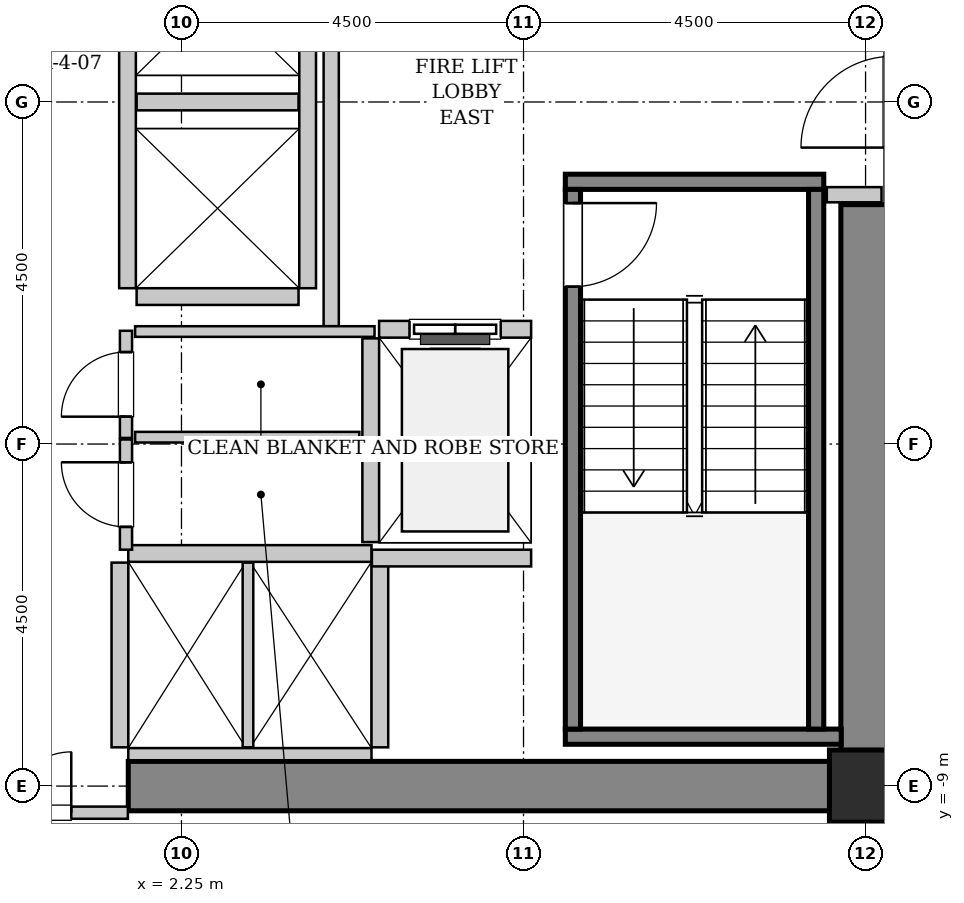
"""IFC4 building model, lengths in metres.
Left out: names, types, materials, properties, quantities, classifications, styles, units other than length and angle.
Written with IfcOpenShell. Run it as: python <this file> out.ifc"""

import sys

from ifc_helpers import new_model, si_unit, direction, frame, frame_2d, origin, origin_2d, place, context, subcontext, project, spatial, rectangle, hollow_rectangle, extrude, source, transform, mapped, element, fill, save


model = new_model("IFC4")
c1 = context("Model", 3, precision=1e-05, world=origin(), true_north=direction((0.0, 1.0)))
c2 = subcontext(c1, "Body", "Model", "MODEL_VIEW")
j1 = project(units=[si_unit("LENGTHUNIT", "METRE"), si_unit("PLANEANGLEUNIT", "RADIAN")], contexts=[c1])
p1 = place(None, origin())
s1 = spatial("IfcSite", under=j1, at=p1, CompositionType="ELEMENT")
p2 = place(p1, origin())
s2 = spatial("IfcBuilding", under=s1, at=p2, CompositionType="ELEMENT")
p3 = place(p2, frame((0.0, 0.0, 71.0)))
s3 = spatial("IfcBuildingStorey", under=s2, at=p3, CompositionType="ELEMENT", Elevation=71.0)
m1 = source(origin(), c2, "Body", "SweptSolid", [
    extrude(rectangle(XDim=10.025, YDim=0.65, at=frame_2d((5.012, 0.0))), origin(), (0.0, 0.0, 1.0), 3.8),
])
p4 = place(p3, frame((1.55, -9.0, 0.0), z_axis=(0.0, 0.0, 1.0), x_axis=(1.0, 0.0, 0.0)))
e1 = element("IfcWall", 1, at=p4, inside=s3, PredefinedType="SHEAR", context=c2, shape_type="MappedRepresentation", body=[
    mapped(m1, transform((0.0, 0.0, 0.0), x_axis=(1.0, 0.0, 0.0), y_axis=(0.0, 1.0, 0.0), z_axis=(0.0, 0.0, 1.0), scale=1.0)),
])
m2 = source(origin(), c2, "Body", "SweptSolid", [
    extrude(rectangle(XDim=7.325, YDim=0.65, at=frame_2d((3.663, 0.0))), origin(), (0.0, 0.0, 1.0), 3.8),
])
p5 = place(p3, frame((11.25, -8.675, 0.0), z_axis=(0.0, 0.0, 1.0), x_axis=(0.0, 1.0, 0.0)))
e2 = element("IfcWall", 2, at=p5, inside=s3, PredefinedType="SHEAR", context=c2, shape_type="MappedRepresentation", body=[
    mapped(m2, transform((0.0, 0.0, 0.0), x_axis=(1.0, 0.0, 0.0), y_axis=(0.0, 1.0, 0.0), z_axis=(0.0, 0.0, 1.0), scale=1.0)),
])
m3 = source(origin(), c2, "Body", "SweptSolid", [
    extrude(hollow_rectangle(XDim=0.95, YDim=0.95, WallThickness=0.045, InnerFilletRadius=0.045, OuterFilletRadius=0.09, at=origin_2d()), origin(), (0.0, 0.0, 1.0), 3.8),
])
p6 = place(p3, frame((11.25, -9.0, 0.0), z_axis=(0.0, 0.0, 1.0), x_axis=(1.0, 0.0, 0.0)))
e3 = element("IfcColumn", 3, at=p6, inside=s3, PredefinedType="COLUMN", context=c2, shape_type="MappedRepresentation", body=[
    mapped(m3, transform((0.0, 0.0, 0.0), x_axis=(1.0, 0.0, 0.0), y_axis=(0.0, 1.0, 0.0), z_axis=(0.0, 0.0, 1.0), scale=1.0)),
])
m4 = source(origin(), c2, "Body", "SweptSolid", [
    extrude(rectangle(XDim=3.4, YDim=0.2, at=frame_2d((1.7, 0.0))), origin(), (0.0, 0.0, 1.0), 3.8),
])
p7 = place(p3, frame((7.3, -1.05, 0.0), z_axis=(0.0, 0.0, 1.0), x_axis=(1.0, 0.0, 0.0)))
e4 = element("IfcWall", 4, at=p7, inside=s3, PredefinedType="SOLIDWALL", context=c2, shape_type="MappedRepresentation", body=[
    mapped(m4, transform((0.0, 0.0, 0.0), x_axis=(1.0, 0.0, 0.0), y_axis=(0.0, 1.0, 0.0), z_axis=(0.0, 0.0, 1.0), scale=1.0)),
])
m5 = source(origin(), c2, "Body", "SweptSolid", [
    extrude(rectangle(XDim=3.63, YDim=0.2, at=frame_2d((1.815, 0.0))), origin(), (0.0, 0.0, 1.0), 3.8),
])
p8 = place(p3, frame((7.3, -8.35, 0.0), z_axis=(0.0, 0.0, 1.0), x_axis=(1.0, 0.0, 0.0)))
e5 = element("IfcWall", 5, at=p8, inside=s3, PredefinedType="SOLIDWALL", context=c2, shape_type="MappedRepresentation", body=[
    mapped(m5, transform((0.0, 0.0, 0.0), x_axis=(1.0, 0.0, 0.0), y_axis=(0.0, 1.0, 0.0), z_axis=(0.0, 0.0, 1.0), scale=1.0)),
])
m6 = source(origin(), c2, "Body", "SweptSolid", [
    extrude(rectangle(XDim=7.1, YDim=0.2, at=frame_2d((3.55, 0.0))), origin(), (0.0, 0.0, 1.0), 3.8),
])
p9 = place(p3, frame((7.4, -1.15, 0.0), z_axis=(0.0, 0.0, 1.0), x_axis=(0.0, -1.0, 0.0)))
e6 = element("IfcWall", 6, at=p9, inside=s3, PredefinedType="SOLIDWALL", context=c2, shape_type="MappedRepresentation", body=[
    mapped(m6, transform((0.0, 0.0, 0.0), x_axis=(1.0, 0.0, 0.0), y_axis=(0.0, 1.0, 0.0), z_axis=(0.0, 0.0, 1.0), scale=1.0)),
])
p10 = place(p9, frame((0.18, 0.0, 0.0)))
e7 = element("IfcOpeningElement", 7, at=p10, cuts=e6, PredefinedType="OPENING", context=c2, shape_type="SweptSolid", body=[
    extrude(rectangle(XDim=1.1, YDim=2.15, at=frame_2d((0.55, 1.075))), frame((0.0, 0.11, 0.0), z_axis=(0.0, -1.0, 0.0), x_axis=(1.0, 0.0, 0.0)), (0.0, 0.0, 1.0), 0.22),
])
p11 = place(p3, frame((10.6, -1.15, 0.0), z_axis=(0.0, 0.0, 1.0), x_axis=(0.0, -1.0, 0.0)))
e8 = element("IfcWall", 8, at=p11, inside=s3, PredefinedType="SOLIDWALL", context=c2, shape_type="MappedRepresentation", body=[
    mapped(m6, transform((0.0, 0.0, 0.0), x_axis=(1.0, 0.0, 0.0), y_axis=(0.0, 1.0, 0.0), z_axis=(0.0, 0.0, 1.0), scale=1.0)),
])
m7 = source(origin(), c2, "Body", "SweptSolid", [
    extrude(rectangle(XDim=2.0, YDim=0.22, at=frame_2d((1.0, 0.0))), origin(), (0.0, 0.0, 1.0), 3.535),
])
p12 = place(p3, frame((6.85, -2.99, 0.0), z_axis=(0.0, 0.0, 1.0), x_axis=(-1.0, 0.0, 0.0)))
e9 = element("IfcWall", 9, at=p12, inside=s3, PredefinedType="SOLIDWALL", context=c2, shape_type="MappedRepresentation", body=[
    mapped(m7, transform((0.0, 0.0, 0.0), x_axis=(1.0, 0.0, 0.0), y_axis=(0.0, 1.0, 0.0), z_axis=(0.0, 0.0, 1.0), scale=1.0)),
])
p13 = place(p12, frame((0.4, 0.0, 0.0)))
e10 = element("IfcOpeningElement", 10, at=p13, cuts=e9, PredefinedType="OPENING", context=c2, shape_type="SweptSolid", body=[
    extrude(rectangle(XDim=1.2, YDim=2.2, at=frame_2d((0.6, 1.1))), frame((0.0, 0.12, 0.0), z_axis=(0.0, -1.0, 0.0), x_axis=(1.0, 0.0, 0.0)), (0.0, 0.0, 1.0), 0.24),
])
m8 = source(origin(), c2, "Body", "SweptSolid", [
    extrude(rectangle(XDim=2.68, YDim=0.22, at=frame_2d((1.34, 0.0))), origin(), (0.0, 0.0, 1.0), 3.535),
])
p14 = place(p3, frame((4.74, -3.11, 0.0), z_axis=(0.0, 0.0, 1.0), x_axis=(0.0, -1.0, 0.0)))
e11 = element("IfcWall", 11, at=p14, inside=s3, PredefinedType="SOLIDWALL", context=c2, shape_type="MappedRepresentation", body=[
    mapped(m8, transform((0.0, 0.0, 0.0), x_axis=(1.0, 0.0, 0.0), y_axis=(0.0, 1.0, 0.0), z_axis=(0.0, 0.0, 1.0), scale=1.0)),
])
m9 = source(origin(), c2, "Body", "SweptSolid", [
    extrude(rectangle(XDim=3.2, YDim=0.22, at=frame_2d((1.6, 0.0))), origin(), (0.0, 0.0, 1.0), 3.535),
])
p15 = place(p3, frame((4.75, -5.94, 0.0), z_axis=(0.0, 0.0, 1.0), x_axis=(-1.0, 0.0, 0.0)))
e12 = element("IfcWall", 12, at=p15, inside=s3, PredefinedType="SOLIDWALL", context=c2, shape_type="MappedRepresentation", body=[
    mapped(m9, transform((0.0, 0.0, 0.0), x_axis=(1.0, 0.0, 0.0), y_axis=(0.0, 1.0, 0.0), z_axis=(0.0, 0.0, 1.0), scale=1.0)),
])
m10 = source(origin(), c2, "Body", "SweptSolid", [
    extrude(rectangle(XDim=3.2, YDim=0.16, at=frame_2d((1.6, 0.0))), origin(), (0.0, 0.0, 1.0), 2.425),
])
p16 = place(p3, frame((1.55, -8.58, 0.0), z_axis=(0.0, 0.0, 1.0), x_axis=(1.0, 0.0, 0.0)))
e13 = element("IfcWall", 13, at=p16, inside=s3, PredefinedType="PARTITIONING", context=c2, shape_type="MappedRepresentation", body=[
    mapped(m10, transform((0.0, 0.0, 0.0), x_axis=(1.0, 0.0, 0.0), y_axis=(0.0, 1.0, 0.0), z_axis=(0.0, 0.0, 1.0), scale=1.0)),
])
m11 = source(origin(), c2, "Body", "SweptSolid", [
    extrude(rectangle(XDim=2.43, YDim=0.22, at=frame_2d((1.215, 0.0))), origin(), (0.0, 0.0, 1.0), 3.535),
])
p17 = place(p3, frame((1.44, -6.06, 0.0), z_axis=(0.0, 0.0, 1.0), x_axis=(0.0, -1.0, 0.0)))
e14 = element("IfcWall", 14, at=p17, inside=s3, PredefinedType="SOLIDWALL", context=c2, shape_type="MappedRepresentation", body=[
    mapped(m11, transform((0.0, 0.0, 0.0), x_axis=(1.0, 0.0, 0.0), y_axis=(0.0, 1.0, 0.0), z_axis=(0.0, 0.0, 1.0), scale=1.0)),
])
m12 = source(origin(), c2, "Body", "SweptSolid", [
    extrude(rectangle(XDim=2.43, YDim=0.14, at=frame_2d((1.215, 0.0))), origin(), (0.0, 0.0, 1.0), 3.535),
])
p18 = place(p3, frame((3.125, -8.49, 0.0), z_axis=(0.0, 0.0, 1.0), x_axis=(0.0, 1.0, 0.0)))
e15 = element("IfcWall", 15, at=p18, inside=s3, PredefinedType="PARTITIONING", context=c2, shape_type="MappedRepresentation", body=[
    mapped(m12, transform((0.0, 0.0, 0.0), x_axis=(1.0, 0.0, 0.0), y_axis=(0.0, 1.0, 0.0), z_axis=(0.0, 0.0, 1.0), scale=1.0)),
])
p19 = place(p3, frame((4.86, -8.49, 0.0), z_axis=(0.0, 0.0, 1.0), x_axis=(0.0, 1.0, 0.0)))
e16 = element("IfcWall", 16, at=p19, inside=s3, PredefinedType="SOLIDWALL", context=c2, shape_type="MappedRepresentation", body=[
    mapped(m11, transform((0.0, 0.0, 0.0), x_axis=(1.0, 0.0, 0.0), y_axis=(0.0, 1.0, 0.0), z_axis=(0.0, 0.0, 1.0), scale=1.0)),
])
m13 = source(origin(), c2, "Body", "SweptSolid", [
    extrude(rectangle(XDim=4.9, YDim=0.22, at=frame_2d((2.45, 0.0))), origin(), (0.0, 0.0, 1.0), 3.535),
])
for number, where, z_axis, x_axis in (
    (17, (1.54, 2.45, 0.0), (0.0, 0.0, 1.0), (0.0, -1.0, 0.0)),
    (18, (3.91, -2.45, 0.0), (0.0, 0.0, 1.0), (0.0, 1.0, 0.0)),
):
    element("IfcWall", number, at=place(p3, frame(where, z_axis=z_axis, x_axis=x_axis)), inside=s3, PredefinedType="SOLIDWALL", context=c2, shape_type="MappedRepresentation", body=[
        mapped(m13, transform((0.0, 0.0, 0.0), x_axis=(1.0, 0.0, 0.0), y_axis=(0.0, 1.0, 0.0), z_axis=(0.0, 0.0, 1.0), scale=1.0)),
    ])
m14 = source(origin(), c2, "Body", "SweptSolid", [
    extrude(rectangle(XDim=2.13, YDim=0.22, at=frame_2d((1.065, 0.0))), origin(), (0.0, 0.0, 1.0), 3.535),
])
for number, where, z_axis, x_axis in (
    (19, (1.66, -2.56, 0.0), (0.0, 0.0, 1.0), (1.0, 0.0, 0.0)),
    (20, (1.66, 0.0, 0.0), (0.0, 0.0, 1.0), (1.0, 0.0, 0.0)),
):
    element("IfcWall", number, at=place(p3, frame(where, z_axis=z_axis, x_axis=x_axis)), inside=s3, PredefinedType="SOLIDWALL", context=c2, shape_type="MappedRepresentation", body=[
        mapped(m14, transform((0.0, 0.0, 0.0), x_axis=(1.0, 0.0, 0.0), y_axis=(0.0, 1.0, 0.0), z_axis=(0.0, 0.0, 1.0), scale=1.0)),
    ])
m15 = source(origin(), c2, "Body", "SweptSolid", [
    extrude(rectangle(XDim=2.095, YDim=0.22, at=frame_2d((1.048, 0.0))), origin(), (0.0, 0.0, 1.0), 3.535),
])
p20 = place(p3, frame((4.755, -6.0, 0.0), z_axis=(0.0, 0.0, 1.0), x_axis=(1.0, 0.0, 0.0)))
e21 = element("IfcWall", 21, at=p20, inside=s3, PredefinedType="SOLIDWALL", context=c2, shape_type="MappedRepresentation", body=[
    mapped(m15, transform((0.0, 0.0, 0.0), x_axis=(1.0, 0.0, 0.0), y_axis=(0.0, 1.0, 0.0), z_axis=(0.0, 0.0, 1.0), scale=1.0)),
])
m16 = source(origin(), c2, "Body", "SweptSolid", [
    extrude(rectangle(XDim=5.9, YDim=0.2, at=frame_2d((2.95, 0.0))), origin(), (0.0, 0.0, 1.0), 3.535),
])
p21 = place(p3, frame((4.22, -2.95, 0.0), z_axis=(0.0, 0.0, 1.0), x_axis=(0.0, 1.0, 0.0)))
e22 = element("IfcWall", 22, at=p21, inside=s3, PredefinedType="PARTITIONING", context=c2, shape_type="MappedRepresentation", body=[
    mapped(m16, transform((0.0, 0.0, 0.0), x_axis=(1.0, 0.0, 0.0), y_axis=(0.0, 1.0, 0.0), z_axis=(0.0, 0.0, 1.0), scale=1.0)),
])
m17 = source(origin(), c2, "Body", "SweptSolid", [
    extrude(rectangle(XDim=0.72, YDim=0.2, at=frame_2d((0.36, 0.0))), origin(), (0.0, 0.0, 1.0), 3.535),
])
p22 = place(p3, frame((10.74, -1.22, 0.0), z_axis=(0.0, 0.0, 1.0), x_axis=(1.0, 0.0, 0.0)))
e23 = element("IfcWall", 23, at=p22, inside=s3, PredefinedType="PARTITIONING", context=c2, shape_type="MappedRepresentation", body=[
    mapped(m17, transform((0.0, 0.0, 0.0), x_axis=(1.0, 0.0, 0.0), y_axis=(0.0, 1.0, 0.0), z_axis=(0.0, 0.0, 1.0), scale=1.0)),
])
m18 = source(origin(), c2, "Body", "SweptSolid", [
    extrude(rectangle(XDim=3.09, YDim=0.16, at=frame_2d((1.545, 0.0))), origin(), (0.0, 0.0, 1.0), 2.425),
])
p23 = place(p3, frame((-1.545, -9.35, 0.0), z_axis=(0.0, 0.0, 1.0), x_axis=(1.0, 0.0, 0.0)))
e24 = element("IfcWall", 24, at=p23, inside=s3, PredefinedType="PARTITIONING", context=c2, shape_type="MappedRepresentation", body=[
    mapped(m18, transform((0.0, 0.0, 0.0), x_axis=(1.0, 0.0, 0.0), y_axis=(0.0, 1.0, 0.0), z_axis=(0.0, 0.0, 1.0), scale=1.0)),
])
p24 = place(p23, frame((0.745, 0.0, 0.0)))
e25 = element("IfcOpeningElement", 25, at=p24, cuts=e24, PredefinedType="OPENING", context=c2, shape_type="SweptSolid", body=[
    extrude(rectangle(XDim=1.6, YDim=2.3, at=frame_2d((0.8, 1.15))), frame((0.0, 0.09, 0.0), z_axis=(0.0, -1.0, 0.0), x_axis=(1.0, 0.0, 0.0)), (0.0, 0.0, 1.0), 0.18),
])
m19 = source(origin(), c2, "Body", "SweptSolid", [
    extrude(rectangle(XDim=1.41, YDim=0.16, at=frame_2d((0.705, 0.0))), origin(), (0.0, 0.0, 1.0), 3.535),
])
p25 = place(p3, frame((1.52, -4.42, 0.0), z_axis=(0.0, 0.0, 1.0), x_axis=(0.0, 1.0, 0.0)))
e26 = element("IfcWall", 26, at=p25, inside=s3, PredefinedType="PARTITIONING", context=c2, shape_type="MappedRepresentation", body=[
    mapped(m19, transform((0.0, 0.0, 0.0), x_axis=(1.0, 0.0, 0.0), y_axis=(0.0, 1.0, 0.0), z_axis=(0.0, 0.0, 1.0), scale=1.0)),
])
p26 = place(p25, frame((0.28, 0.0, 0.0)))
e27 = element("IfcOpeningElement", 27, at=p26, cuts=e26, PredefinedType="OPENING", context=c2, shape_type="SweptSolid", body=[
    extrude(rectangle(XDim=0.85, YDim=2.1, at=frame_2d((0.425, 1.05))), frame((0.0, 0.09, 0.0), z_axis=(0.0, -1.0, 0.0), x_axis=(1.0, 0.0, 0.0)), (0.0, 0.0, 1.0), 0.18),
])
m20 = source(origin(), c2, "Body", "SweptSolid", [
    extrude(rectangle(XDim=3.15, YDim=0.14, at=frame_2d((1.575, 0.0))), origin(), (0.0, 0.0, 1.0), 3.535),
])
p27 = place(p3, frame((1.64, -3.02, 0.0), z_axis=(0.0, 0.0, 1.0), x_axis=(1.0, 0.0, 0.0)))
e28 = element("IfcWall", 28, at=p27, inside=s3, PredefinedType="PARTITIONING", context=c2, shape_type="MappedRepresentation", body=[
    mapped(m20, transform((0.0, 0.0, 0.0), x_axis=(1.0, 0.0, 0.0), y_axis=(0.0, 1.0, 0.0), z_axis=(0.0, 0.0, 1.0), scale=1.0)),
])
m21 = source(origin(), c2, "Body", "SweptSolid", [
    extrude(rectangle(XDim=2.95, YDim=0.14, at=frame_2d((1.475, 0.0))), origin(), (0.0, 0.0, 1.0), 3.535),
])
p28 = place(p3, frame((1.64, -4.41, 0.0), z_axis=(0.0, 0.0, 1.0), x_axis=(1.0, 0.0, 0.0)))
e29 = element("IfcWall", 29, at=p28, inside=s3, PredefinedType="PARTITIONING", context=c2, shape_type="MappedRepresentation", body=[
    mapped(m21, transform((0.0, 0.0, 0.0), x_axis=(1.0, 0.0, 0.0), y_axis=(0.0, 1.0, 0.0), z_axis=(0.0, 0.0, 1.0), scale=1.0)),
])
m22 = source(origin(), c2, "Body", "SweptSolid", [
    extrude(rectangle(XDim=1.45, YDim=0.16, at=frame_2d((0.725, 0.0))), origin(), (0.0, 0.0, 1.0), 3.535),
])
p29 = place(p3, frame((1.52, -5.89, 0.0), z_axis=(0.0, 0.0, 1.0), x_axis=(0.0, 1.0, 0.0)))
e30 = element("IfcWall", 30, at=p29, inside=s3, PredefinedType="PARTITIONING", context=c2, shape_type="MappedRepresentation", body=[
    mapped(m22, transform((0.0, 0.0, 0.0), x_axis=(1.0, 0.0, 0.0), y_axis=(0.0, 1.0, 0.0), z_axis=(0.0, 0.0, 1.0), scale=1.0)),
])
p30 = place(p29, frame((0.3, 0.0, 0.0)))
e31 = element("IfcOpeningElement", 31, at=p30, cuts=e30, PredefinedType="OPENING", context=c2, shape_type="SweptSolid", body=[
    extrude(rectangle(XDim=0.85, YDim=2.1, at=frame_2d((0.425, 1.05))), frame((0.0, 0.09, 0.0), z_axis=(0.0, -1.0, 0.0), x_axis=(1.0, 0.0, 0.0)), (0.0, 0.0, 1.0), 0.18),
])
m23 = source(origin(), c2, "Body", "SweptSolid", [
    extrude(rectangle(XDim=1.1, YDim=2.15, at=frame_2d((0.55, 1.075))), frame((0.0, 0.025, 0.0), z_axis=(0.0, -1.0, 0.0), x_axis=(1.0, 0.0, 0.0)), (0.0, 0.0, 1.0), 0.05),
])
p31 = place(p10, origin())
e32 = element("IfcDoor", 32, at=p31, inside=s3, OperationType="SINGLE_SWING_LEFT", PredefinedType="DOOR", context=c2, shape_type="MappedRepresentation", body=[
    mapped(m23, transform((0.0, 0.0, 0.0), x_axis=(1.0, 0.0, 0.0), y_axis=(0.0, 1.0, 0.0), z_axis=(0.0, 0.0, 1.0), scale=1.0)),
])
fill(e7, e32)
m24 = source(origin(), c2, "Body", "SweptSolid", [
    extrude(rectangle(XDim=1.2, YDim=2.2, at=frame_2d((0.6, 1.1))), frame((0.0, 0.025, 0.0), z_axis=(0.0, -1.0, 0.0), x_axis=(1.0, 0.0, 0.0)), (0.0, 0.0, 1.0), 0.05),
])
p32 = place(p13, origin())
e33 = element("IfcDoor", 33, at=p32, inside=s3, OperationType="SLIDING_TO_LEFT", PredefinedType="DOOR", context=c2, shape_type="MappedRepresentation", body=[
    mapped(m24, transform((0.0, 0.0, 0.0), x_axis=(1.0, 0.0, 0.0), y_axis=(0.0, 1.0, 0.0), z_axis=(0.0, 0.0, 1.0), scale=1.0)),
])
fill(e10, e33)
m25 = source(origin(), c2, "Body", "SweptSolid", [
    extrude(rectangle(XDim=1.6, YDim=2.3, at=frame_2d((0.8, 1.15))), frame((0.0, 0.025, 0.0), z_axis=(0.0, -1.0, 0.0), x_axis=(1.0, 0.0, 0.0)), (0.0, 0.0, 1.0), 0.05),
])
p33 = place(p24, origin())
e34 = element("IfcDoor", 34, at=p33, inside=s3, OperationType="DOUBLE_DOOR_SINGLE_SWING", PredefinedType="DOOR", context=c2, shape_type="MappedRepresentation", body=[
    mapped(m25, transform((0.0, 0.0, 0.0), x_axis=(1.0, 0.0, 0.0), y_axis=(0.0, 1.0, 0.0), z_axis=(0.0, 0.0, 1.0), scale=1.0)),
])
fill(e25, e34)
m26 = source(origin(), c2, "Body", "SweptSolid", [
    extrude(rectangle(XDim=0.85, YDim=2.1, at=frame_2d((0.425, 1.05))), frame((0.0, 0.025, 0.0), z_axis=(0.0, -1.0, 0.0), x_axis=(1.0, 0.0, 0.0)), (0.0, 0.0, 1.0), 0.05),
])
p34 = place(p26, origin())
e35 = element("IfcDoor", 35, at=p34, inside=s3, OperationType="SINGLE_SWING_LEFT", PredefinedType="DOOR", context=c2, shape_type="MappedRepresentation", body=[
    mapped(m26, transform((0.0, 0.0, 0.0), x_axis=(1.0, 0.0, 0.0), y_axis=(0.0, 1.0, 0.0), z_axis=(0.0, 0.0, 1.0), scale=1.0)),
])
fill(e27, e35)
p35 = place(p30, origin())
e36 = element("IfcDoor", 36, at=p35, inside=s3, OperationType="SINGLE_SWING_RIGHT", PredefinedType="DOOR", context=c2, shape_type="MappedRepresentation", body=[
    mapped(m26, transform((0.0, 0.0, 0.0), x_axis=(1.0, 0.0, 0.0), y_axis=(0.0, 1.0, 0.0), z_axis=(0.0, 0.0, 1.0), scale=1.0)),
])
fill(e31, e36)
save(model, sys.argv[1])
